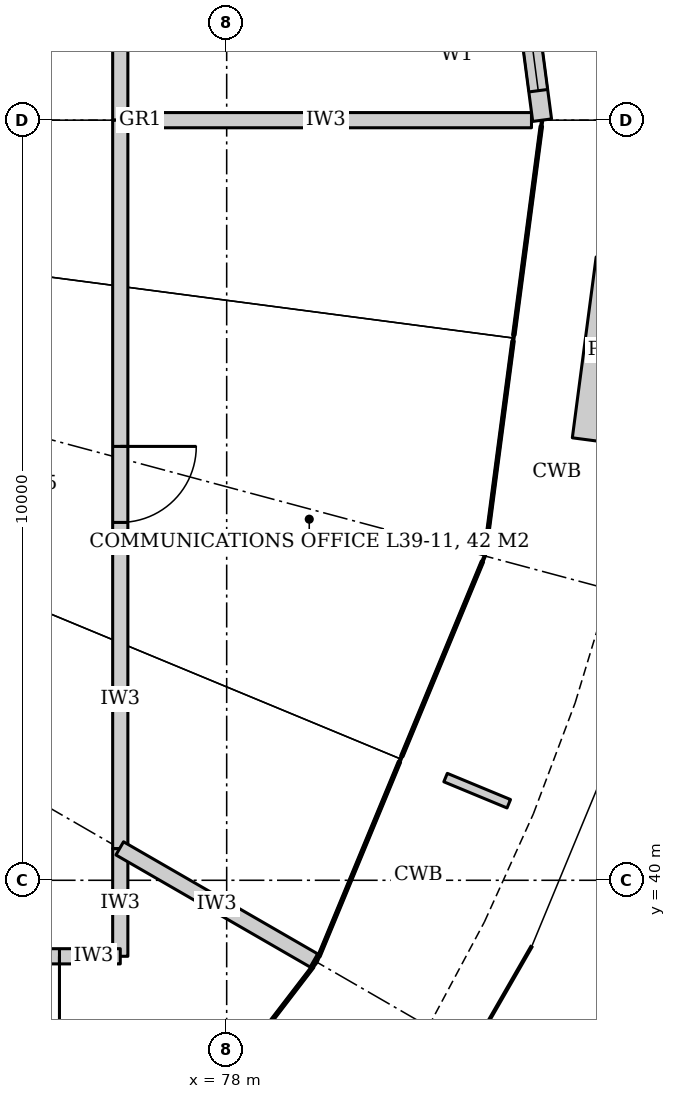
"""IFC4 building model, lengths in metres.
Left out: names, types, materials, properties, quantities, classifications, styles, units other than length and angle.
Written with IfcOpenShell. Run it as: python <this file> out.ifc"""

import sys

from ifc_helpers import new_model, si_unit, direction, frame, frame_2d, origin, place, context, subcontext, project, spatial, rectangle, extrude, element, fill, save


model = new_model("IFC4")
c1 = context("Model", 3, precision=1e-05, world=origin(), true_north=direction((0.0, 1.0)))
c2 = subcontext(c1, "Body", "Model", "MODEL_VIEW")
j1 = project(units=[si_unit("LENGTHUNIT", "METRE"), si_unit("PLANEANGLEUNIT", "RADIAN")], contexts=[c1])
p1 = place(None, origin())
s1 = spatial("IfcSite", under=j1, at=p1, CompositionType="ELEMENT")
p2 = place(p1, origin())
s2 = spatial("IfcBuilding", under=s1, at=p2, CompositionType="ELEMENT")
p3 = place(p2, frame((0.0, 0.0, 173.0)))
s3 = spatial("IfcBuildingStorey", under=s2, at=p3, CompositionType="ELEMENT", Elevation=173.0)
p4 = place(p3, frame((76.6, 59.05, 0.0), z_axis=(0.0, 0.0, 1.0), x_axis=(0.0, -1.0, 0.0)))
e1 = element("IfcWall", 1, at=p4, inside=s3, PredefinedType="PARTITIONING", context=c2, shape_type="SweptSolid", body=[
    extrude(rectangle(XDim=9.05, YDim=0.2, at=frame_2d((4.525, 0.0))), origin(), (0.0, 0.0, 1.0), 3.012),
])
p5 = place(p3, frame((76.6, 50.0, 0.0), z_axis=(0.0, 0.0, 1.0), x_axis=(0.0, -1.0, 0.0)))
e2 = element("IfcWall", 2, at=p5, inside=s3, PredefinedType="PARTITIONING", context=c2, shape_type="SweptSolid", body=[
    extrude(rectangle(XDim=9.584, YDim=0.2, at=frame_2d((4.792, 0.0))), origin(), (0.0, 0.0, 1.0), 3.012),
])
p6 = place(p5, frame((4.292, 0.0, 0.0)))
e3 = element("IfcOpeningElement", 3, at=p6, cuts=e2, PredefinedType="OPENING", context=c2, shape_type="SweptSolid", body=[
    extrude(rectangle(XDim=1.0, YDim=2.1, at=frame_2d((0.5, 1.05))), frame((0.0, 0.11, 0.0), z_axis=(0.0, -1.0, 0.0), x_axis=(1.0, 0.0, 0.0)), (0.0, 0.0, 1.0), 0.22),
])
p7 = place(p3, frame((76.6, 40.416, 0.0), z_axis=(0.0, 0.0, 1.0), x_axis=(0.0, -1.0, 0.0)))
e4 = element("IfcWall", 4, at=p7, inside=s3, PredefinedType="PARTITIONING", context=c2, shape_type="SweptSolid", body=[
    extrude(rectangle(XDim=1.416, YDim=0.2, at=frame_2d((0.708, 0.0))), origin(), (0.0, 0.0, 1.0), 3.012),
])
p8 = place(p3, frame((76.6, 39.0, 0.0), z_axis=(0.0, 0.0, 1.0), x_axis=(-1.0, 0.0, 0.0)))
e5 = element("IfcWall", 5, at=p8, inside=s3, PredefinedType="PARTITIONING", context=c2, shape_type="SweptSolid", body=[
    extrude(rectangle(XDim=3.6, YDim=0.2, at=frame_2d((1.8, 0.0))), origin(), (0.0, 0.0, 1.0), 3.04),
])
p9 = place(p8, frame((0.8, 0.0, 0.0)))
e6 = element("IfcOpeningElement", 6, at=p9, cuts=e5, PredefinedType="OPENING", context=c2, shape_type="SweptSolid", body=[
    extrude(rectangle(XDim=2.0, YDim=2.1, at=frame_2d((1.0, 1.05))), frame((0.0, 0.11, 0.0), z_axis=(0.0, -1.0, 0.0), x_axis=(1.0, 0.0, 0.0)), (0.0, 0.0, 1.0), 0.22),
])
p10 = place(p3, frame((76.6, 50.0, 0.0), z_axis=(0.0, 0.0, 1.0), x_axis=(1.0, 0.0, 0.0)))
e7 = element("IfcWall", 7, at=p10, inside=s3, PredefinedType="PARTITIONING", context=c2, shape_type="SweptSolid", body=[
    extrude(rectangle(XDim=5.41, YDim=0.2, at=frame_2d((2.705, 0.0))), origin(), (0.0, 0.0, 1.0), 3.012),
])
p11 = place(p3, frame((76.593, 40.42, 0.0), z_axis=(0.0, 0.0, 1.0), x_axis=(0.866039495442, -0.49997559174, 0.0)))
e8 = element("IfcWall", 8, at=p11, inside=s3, PredefinedType="PARTITIONING", context=c2, shape_type="SweptSolid", body=[
    extrude(rectangle(XDim=2.95, YDim=0.2, at=frame_2d((1.475, 0.0))), origin(), (0.0, 0.0, 1.0), 3.012),
])
p12 = place(p3, frame((82.15, 50.0, 0.0), z_axis=(0.0, 0.0, 1.0), x_axis=(-0.130506937291, 0.991447396143, 0.0)))
e9 = element("IfcWall", 9, at=p12, inside=s3, PredefinedType="SOLIDWALL", context=c2, shape_type="SweptSolid", body=[
    extrude(rectangle(XDim=5.782, YDim=0.25, at=frame_2d((2.891, 0.0))), origin(), (0.0, 0.0, 1.0), 4.04),
])
p13 = place(p12, frame((1.991, 0.0, 0.0)))
e10 = element("IfcOpeningElement", 10, at=p13, cuts=e9, PredefinedType="OPENING", context=c2, shape_type="SweptSolid", body=[
    extrude(rectangle(XDim=1.8, YDim=2.4, at=frame_2d((0.9, 1.2))), frame((0.0, 0.135, 0.0), z_axis=(0.0, -1.0, 0.0), x_axis=(1.0, 0.0, 0.0)), (0.0, 0.0, 1.0), 0.27),
])
p14 = place(p12, frame((0.391, 0.0, 0.0)))
e11 = element("IfcOpeningElement", 11, at=p14, cuts=e9, PredefinedType="OPENING", context=c2, shape_type="SweptSolid", body=[
    extrude(rectangle(XDim=1.2, YDim=2.4, at=frame_2d((0.6, 1.2))), frame((0.0, 0.135, 0.0), z_axis=(0.0, -1.0, 0.0), x_axis=(1.0, 0.0, 0.0)), (0.0, 0.0, 1.0), 0.27),
])
p15 = place(p12, frame((4.191, 0.0, 0.0)))
e12 = element("IfcOpeningElement", 12, at=p15, cuts=e9, PredefinedType="OPENING", context=c2, shape_type="SweptSolid", body=[
    extrude(rectangle(XDim=1.2, YDim=2.4, at=frame_2d((0.6, 1.2))), frame((0.0, 0.135, 0.0), z_axis=(0.0, -1.0, 0.0), x_axis=(1.0, 0.0, 0.0)), (0.0, 0.0, 1.0), 0.27),
])
p16 = place(p9, origin())
e13 = element("IfcDoor", 13, at=p16, inside=s3, OperationType="DOUBLE_DOOR_DOUBLE_SWING", PredefinedType="DOOR", context=c2, shape_type="SweptSolid", body=[
    extrude(rectangle(XDim=2.0, YDim=2.1, at=frame_2d((1.0, 1.05))), frame((0.0, 0.025, 0.0), z_axis=(0.0, -1.0, 0.0), x_axis=(1.0, 0.0, 0.0)), (0.0, 0.0, 1.0), 0.05),
])
fill(e6, e13)
p17 = place(p6, origin())
e14 = element("IfcDoor", 14, at=p17, inside=s3, OperationType="SINGLE_SWING_LEFT", PredefinedType="DOOR", context=c2, shape_type="SweptSolid", body=[
    extrude(rectangle(XDim=1.0, YDim=2.1, at=frame_2d((0.5, 1.05))), frame((0.0, 0.025, 0.0), z_axis=(0.0, -1.0, 0.0), x_axis=(1.0, 0.0, 0.0)), (0.0, 0.0, 1.0), 0.05),
])
fill(e3, e14)
p18 = place(p14, origin())
e15 = element("IfcWindow", 15, at=p18, inside=s3, PartitioningType="SINGLE_PANEL", PredefinedType="WINDOW", context=c2, shape_type="SweptSolid", body=[
    extrude(rectangle(XDim=1.2, YDim=2.4, at=frame_2d((0.6, 1.2))), frame((0.0, 0.03, 0.0), z_axis=(0.0, -1.0, 0.0), x_axis=(1.0, 0.0, 0.0)), (0.0, 0.0, 1.0), 0.06),
])
fill(e11, e15)
save(model, sys.argv[1])
